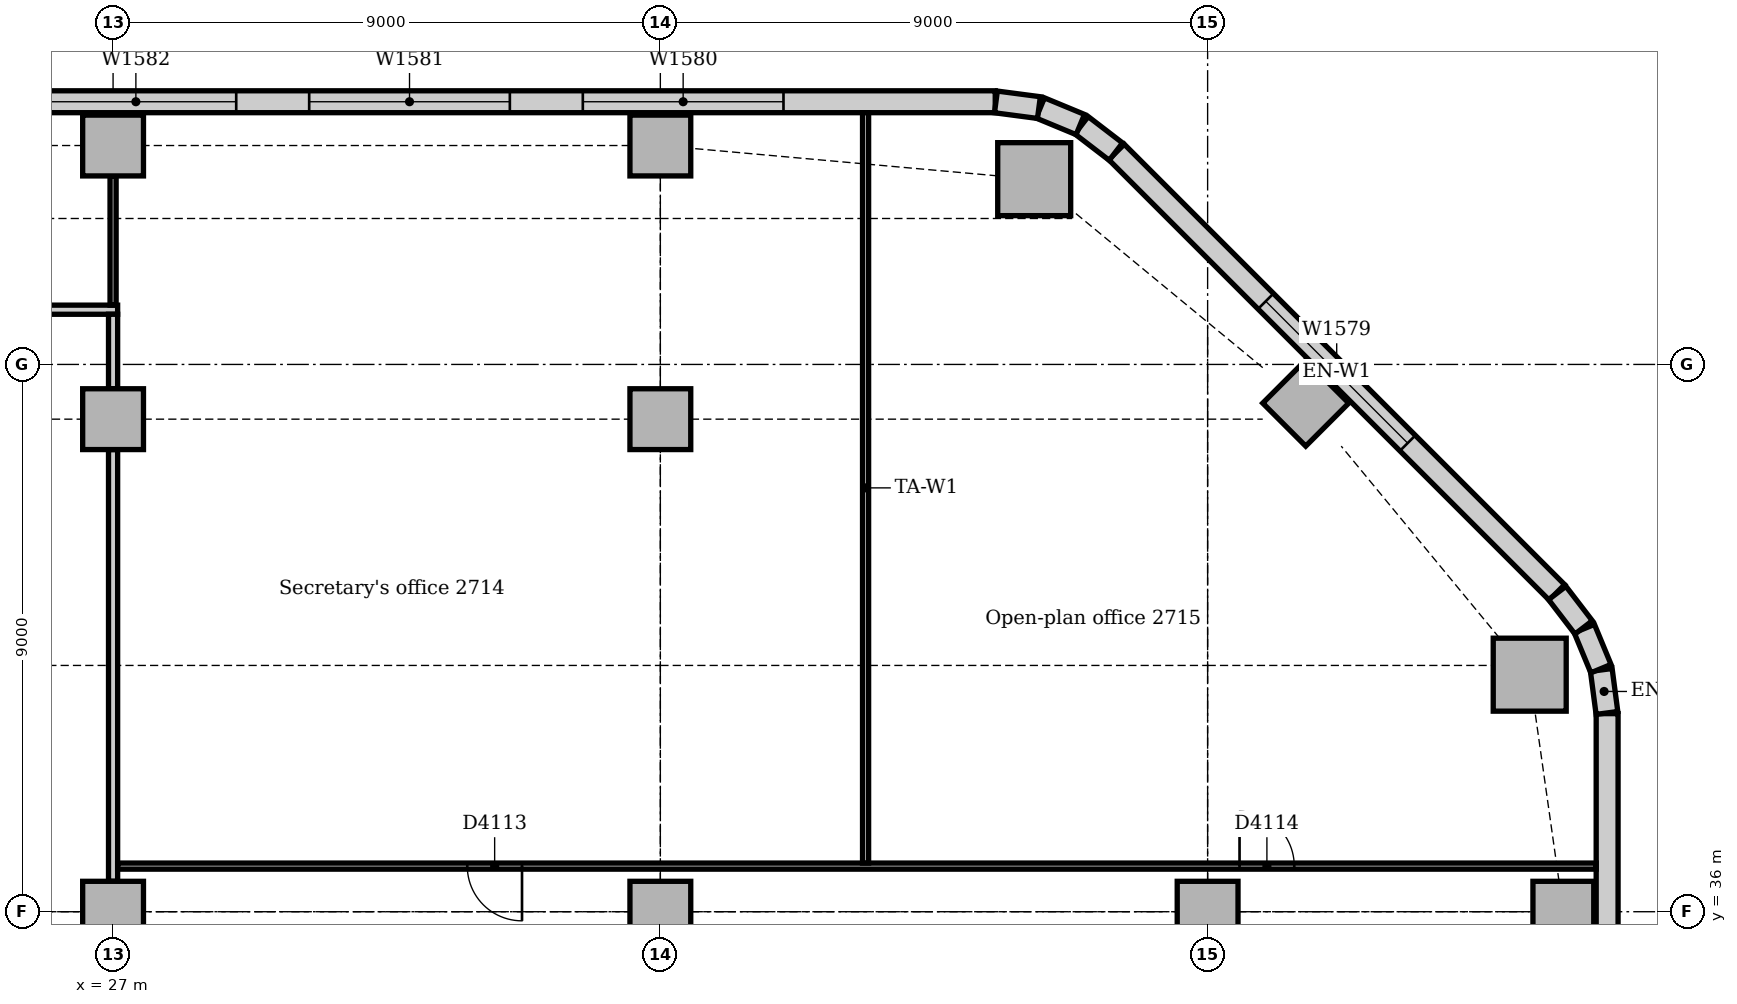
"""IFC4 building model, lengths in metres.
Left out: names, types, materials, properties, quantities, classifications, styles, units other than length and angle.
Written with IfcOpenShell. Run it as: python <this file> out.ifc"""

import sys

from ifc_helpers import new_model, si_unit, direction, frame, frame_2d, origin, origin_2d, place, context, subcontext, project, spatial, rectangle, extrude, element, fill, save


model = new_model("IFC4")
c1 = context("Model", 3, precision=1e-05, world=origin(), true_north=direction((0.0, 1.0)))
c2 = subcontext(c1, "Body", "Model", "MODEL_VIEW")
j1 = project(units=[si_unit("LENGTHUNIT", "METRE"), si_unit("PLANEANGLEUNIT", "RADIAN")], contexts=[c1])
p1 = place(None, origin())
s1 = spatial("IfcSite", under=j1, at=p1, CompositionType="ELEMENT")
p2 = place(p1, origin())
s2 = spatial("IfcBuilding", under=s1, at=p2, CompositionType="ELEMENT")
p3 = place(p2, frame((0.0, 0.0, 116.0)))
s3 = spatial("IfcBuildingStorey", under=s2, at=p3, CompositionType="ELEMENT", Elevation=116.0)
for number, where, z_axis, x_axis in (
    (1, (50.297, 39.898, 0.0), (0.0, 0.0, 1.0), (1.0, 0.0, 0.0)),
    (2, (42.148, 48.047, 0.0), (0.0, 0.0, 1.0), (1.0, 0.0, 0.0)),
):
    element("IfcColumn", number, at=place(p3, frame(where, z_axis=z_axis, x_axis=x_axis)), inside=s3, PredefinedType="COLUMN", context=c2, shape_type="SweptSolid", body=[
        extrude(rectangle(XDim=1.2, YDim=1.2, at=origin_2d()), origin(), (0.0, 0.0, 1.0), 3.85),
    ])
for number, where, z_axis, x_axis in (
    (3, (50.85, 36.0, 0.0), (0.0, 0.0, 1.0), (1.0, 0.0, 0.0)),
    (4, (46.614, 44.364, 0.0), (0.0, 0.0, 1.0), (0.707, 0.707, 0.0)),
    (5, (27.0, 48.6, 0.0), (0.0, 0.0, 1.0), (1.0, 0.0, 0.0)),
    (6, (36.0, 48.6, 0.0), (0.0, 0.0, 1.0), (1.0, 0.0, 0.0)),
    (7, (27.0, 36.0, 0.0), (0.0, 0.0, 1.0), (1.0, 0.0, 0.0)),
    (8, (27.0, 44.1, 0.0), (0.0, 0.0, 1.0), (1.0, 0.0, 0.0)),
    (9, (36.0, 36.0, 0.0), (0.0, 0.0, 1.0), (1.0, 0.0, 0.0)),
    (10, (36.0, 44.1, 0.0), (0.0, 0.0, 1.0), (1.0, 0.0, 0.0)),
    (11, (45.0, 36.0, 0.0), (0.0, 0.0, 1.0), (1.0, 0.0, 0.0)),
):
    element("IfcColumn", number, at=place(p3, frame(where, z_axis=z_axis, x_axis=x_axis)), inside=s3, PredefinedType="COLUMN", context=c2, shape_type="SweptSolid", body=[
        extrude(rectangle(XDim=1.0, YDim=1.0, at=origin_2d()), origin(), (0.0, 0.0, 1.0), 3.85),
    ])
p4 = place(p3, frame((51.57, 14.743, 0.0), z_axis=(0.0, 0.0, 1.0), x_axis=(0.0, 1.0, 0.0)))
e12 = element("IfcWall", 12, at=p4, inside=s3, PredefinedType="STANDARD", context=c2, shape_type="SweptSolid", body=[
    extrude(rectangle(XDim=24.515, YDim=0.36, at=frame_2d((12.257, 0.0))), origin(), (0.0, 0.0, 1.0), 3.85),
])
p5 = place(p4, frame((4.257, 0.0, 0.9)))
e13 = element("IfcOpeningElement", 13, at=p5, cuts=e12, PredefinedType="OPENING", context=c2, shape_type="SweptSolid", body=[
    extrude(rectangle(XDim=1.8, YDim=1.6, at=frame_2d((0.9, 0.8))), frame((0.0, 0.19, 0.0), z_axis=(0.0, -1.0, 0.0), x_axis=(1.0, 0.0, 0.0)), (0.0, 0.0, 1.0), 0.38),
])
p6 = place(p4, frame((8.357, 0.0, 0.9)))
e14 = element("IfcOpeningElement", 14, at=p6, cuts=e12, PredefinedType="OPENING", context=c2, shape_type="SweptSolid", body=[
    extrude(rectangle(XDim=3.3, YDim=1.6, at=frame_2d((1.65, 0.8))), frame((0.0, 0.19, 0.0), z_axis=(0.0, -1.0, 0.0), x_axis=(1.0, 0.0, 0.0)), (0.0, 0.0, 1.0), 0.38),
])
p7 = place(p4, frame((12.857, 0.0, 0.9)))
e15 = element("IfcOpeningElement", 15, at=p7, cuts=e12, PredefinedType="OPENING", context=c2, shape_type="SweptSolid", body=[
    extrude(rectangle(XDim=3.3, YDim=1.6, at=frame_2d((1.65, 0.8))), frame((0.0, 0.19, 0.0), z_axis=(0.0, -1.0, 0.0), x_axis=(1.0, 0.0, 0.0)), (0.0, 0.0, 1.0), 0.38),
])
p8 = place(p4, frame((17.357, 0.0, 0.9)))
e16 = element("IfcOpeningElement", 16, at=p8, cuts=e12, PredefinedType="OPENING", context=c2, shape_type="SweptSolid", body=[
    extrude(rectangle(XDim=3.3, YDim=1.6, at=frame_2d((1.65, 0.8))), frame((0.0, 0.19, 0.0), z_axis=(0.0, -1.0, 0.0), x_axis=(1.0, 0.0, 0.0)), (0.0, 0.0, 1.0), 0.38),
])
p9 = place(p3, frame((50.744, 41.251, 0.0), z_axis=(0.0, 0.0, 1.0), x_axis=(-0.707106781187, 0.707106781187, 0.0)))
e17 = element("IfcWall", 17, at=p9, inside=s3, PredefinedType="STANDARD", context=c2, shape_type="SweptSolid", body=[
    extrude(rectangle(XDim=10.243, YDim=0.36, at=frame_2d((5.121, 0.0))), origin(), (0.0, 0.0, 1.0), 3.85),
])
p10 = place(p9, frame((3.471, 0.0, 0.9)))
e18 = element("IfcOpeningElement", 18, at=p10, cuts=e17, PredefinedType="OPENING", context=c2, shape_type="SweptSolid", body=[
    extrude(rectangle(XDim=3.3, YDim=1.6, at=frame_2d((1.65, 0.8))), frame((0.0, 0.19, 0.0), z_axis=(0.0, -1.0, 0.0), x_axis=(1.0, 0.0, 0.0)), (0.0, 0.0, 1.0), 0.38),
])
p11 = place(p3, frame((41.507, 49.32, 0.0), z_axis=(0.0, 0.0, 1.0), x_axis=(-1.0, 0.0, 0.0)))
e19 = element("IfcWall", 19, at=p11, inside=s3, PredefinedType="STANDARD", context=c2, shape_type="SweptSolid", body=[
    extrude(rectangle(XDim=37.265, YDim=0.36, at=frame_2d((18.632, 0.0))), origin(), (0.0, 0.0, 1.0), 3.85),
])
p12 = place(p11, frame((3.482, 0.0, 0.9)))
e20 = element("IfcOpeningElement", 20, at=p12, cuts=e19, PredefinedType="OPENING", context=c2, shape_type="SweptSolid", body=[
    extrude(rectangle(XDim=3.3, YDim=1.6, at=frame_2d((1.65, 0.8))), frame((0.0, 0.19, 0.0), z_axis=(0.0, -1.0, 0.0), x_axis=(1.0, 0.0, 0.0)), (0.0, 0.0, 1.0), 0.38),
])
p13 = place(p11, frame((7.982, 0.0, 0.9)))
e21 = element("IfcOpeningElement", 21, at=p13, cuts=e19, PredefinedType="OPENING", context=c2, shape_type="SweptSolid", body=[
    extrude(rectangle(XDim=3.3, YDim=1.6, at=frame_2d((1.65, 0.8))), frame((0.0, 0.19, 0.0), z_axis=(0.0, -1.0, 0.0), x_axis=(1.0, 0.0, 0.0)), (0.0, 0.0, 1.0), 0.38),
])
p14 = place(p11, frame((12.482, 0.0, 0.9)))
e22 = element("IfcOpeningElement", 22, at=p14, cuts=e19, PredefinedType="OPENING", context=c2, shape_type="SweptSolid", body=[
    extrude(rectangle(XDim=3.3, YDim=1.6, at=frame_2d((1.65, 0.8))), frame((0.0, 0.19, 0.0), z_axis=(0.0, -1.0, 0.0), x_axis=(1.0, 0.0, 0.0)), (0.0, 0.0, 1.0), 0.38),
])
p15 = place(p11, frame((16.982, 0.0, 0.9)))
e23 = element("IfcOpeningElement", 23, at=p15, cuts=e19, PredefinedType="OPENING", context=c2, shape_type="SweptSolid", body=[
    extrude(rectangle(XDim=3.3, YDim=1.6, at=frame_2d((1.65, 0.8))), frame((0.0, 0.19, 0.0), z_axis=(0.0, -1.0, 0.0), x_axis=(1.0, 0.0, 0.0)), (0.0, 0.0, 1.0), 0.38),
])
p16 = place(p11, frame((21.482, 0.0, 0.9)))
e24 = element("IfcOpeningElement", 24, at=p16, cuts=e19, PredefinedType="OPENING", context=c2, shape_type="SweptSolid", body=[
    extrude(rectangle(XDim=3.3, YDim=1.6, at=frame_2d((1.65, 0.8))), frame((0.0, 0.19, 0.0), z_axis=(0.0, -1.0, 0.0), x_axis=(1.0, 0.0, 0.0)), (0.0, 0.0, 1.0), 0.38),
])
p17 = place(p11, frame((26.032, 0.0, 0.9)))
e25 = element("IfcOpeningElement", 25, at=p17, cuts=e19, PredefinedType="OPENING", context=c2, shape_type="SweptSolid", body=[
    extrude(rectangle(XDim=1.8, YDim=1.6, at=frame_2d((0.9, 0.8))), frame((0.0, 0.19, 0.0), z_axis=(0.0, -1.0, 0.0), x_axis=(1.0, 0.0, 0.0)), (0.0, 0.0, 1.0), 0.38),
])
p18 = place(p11, frame((30.482, 0.0, 0.9)))
e26 = element("IfcOpeningElement", 26, at=p18, cuts=e19, PredefinedType="OPENING", context=c2, shape_type="SweptSolid", body=[
    extrude(rectangle(XDim=3.3, YDim=1.6, at=frame_2d((1.65, 0.8))), frame((0.0, 0.19, 0.0), z_axis=(0.0, -1.0, 0.0), x_axis=(1.0, 0.0, 0.0)), (0.0, 0.0, 1.0), 0.38),
])
for number, where, z_axis, x_axis in (
    (27, (51.567, 39.269, 0.0), (0.0, 0.0, 1.0), (-0.131, 0.991, 0.0)),
    (28, (51.468, 39.997, 0.0), (0.0, 0.0, 1.0), (-0.383, 0.924, 0.0)),
):
    element("IfcWall", number, at=place(p3, frame(where, z_axis=z_axis, x_axis=x_axis)), inside=s3, PredefinedType="STANDARD", context=c2, shape_type="SweptSolid", body=[
        extrude(rectangle(XDim=0.713, YDim=0.36, at=frame_2d((0.356, 0.0))), origin(), (0.0, 0.0, 1.0), 3.85),
    ])
for number, where, z_axis, x_axis in (
    (29, (51.184, 40.675, 0.0), (0.0, 0.0, 1.0), (-0.609, 0.793, 0.0)),
    (30, (43.491, 48.5, 0.0), (0.0, 0.0, 1.0), (-0.793, 0.609, 0.0)),
):
    element("IfcWall", number, at=place(p3, frame(where, z_axis=z_axis, x_axis=x_axis)), inside=s3, PredefinedType="STANDARD", context=c2, shape_type="SweptSolid", body=[
        extrude(rectangle(XDim=0.713, YDim=0.36, at=frame_2d((0.357, 0.0))), origin(), (0.0, 0.0, 1.0), 3.85),
    ])
for number, where, z_axis, x_axis in (
    (31, (42.906, 48.945, 0.0), (0.0, 0.0, 1.0), (-0.924, 0.383, 0.0)),
    (32, (42.226, 49.224, 0.0), (0.0, 0.0, 1.0), (-0.991, 0.131, 0.0)),
):
    element("IfcWall", number, at=place(p3, frame(where, z_axis=z_axis, x_axis=x_axis)), inside=s3, PredefinedType="STANDARD", context=c2, shape_type="SweptSolid", body=[
        extrude(rectangle(XDim=0.713, YDim=0.36, at=frame_2d((0.356, 0.0))), origin(), (0.0, 0.0, 1.0), 3.85),
    ])
p19 = place(p3, frame((2.053, 45.9, 0.0), z_axis=(0.0, 0.0, 1.0), x_axis=(1.0, 0.0, 0.0)))
e33 = element("IfcWall", 33, at=p19, inside=s3, PredefinedType="PARTITIONING", context=c2, shape_type="SweptSolid", body=[
    extrude(rectangle(XDim=25.022, YDim=0.15, at=frame_2d((12.511, 0.0))), origin(), (0.0, 0.0, 1.0), 3.85),
])
p20 = place(p19, frame((5.35, 0.0, 0.0)))
e34 = element("IfcOpeningElement", 34, at=p20, cuts=e33, PredefinedType="OPENING", context=c2, shape_type="SweptSolid", body=[
    extrude(rectangle(XDim=0.9, YDim=2.1, at=frame_2d((0.45, 1.05))), frame((0.0, 0.085, 0.0), z_axis=(0.0, -1.0, 0.0), x_axis=(1.0, 0.0, 0.0)), (0.0, 0.0, 1.0), 0.17),
])
p21 = place(p19, frame((15.497, 0.0, 0.0)))
e35 = element("IfcOpeningElement", 35, at=p21, cuts=e33, PredefinedType="OPENING", context=c2, shape_type="SweptSolid", body=[
    extrude(rectangle(XDim=0.9, YDim=2.1, at=frame_2d((0.45, 1.05))), frame((0.0, 0.085, 0.0), z_axis=(0.0, -1.0, 0.0), x_axis=(1.0, 0.0, 0.0)), (0.0, 0.0, 1.0), 0.17),
])
p22 = place(p3, frame((27.0, 36.5, 0.0), z_axis=(0.0, 0.0, 1.0), x_axis=(0.0, 1.0, 0.0)))
e36 = element("IfcWall", 36, at=p22, inside=s3, PredefinedType="PARTITIONING", context=c2, shape_type="SweptSolid", body=[
    extrude(rectangle(XDim=7.1, YDim=0.15, at=frame_2d((3.55, 0.0))), origin(), (0.0, 0.0, 1.0), 3.256),
])
p23 = place(p3, frame((27.0, 44.6, 0.0), z_axis=(0.0, 0.0, 1.0), x_axis=(0.0, 1.0, 0.0)))
e37 = element("IfcWall", 37, at=p23, inside=s3, PredefinedType="PARTITIONING", context=c2, shape_type="SweptSolid", body=[
    extrude(rectangle(XDim=1.225, YDim=0.15, at=frame_2d((0.613, 0.0))), origin(), (0.0, 0.0, 1.0), 3.652),
])
p24 = place(p3, frame((27.075, 36.75, 0.0), z_axis=(0.0, 0.0, 1.0), x_axis=(1.0, 0.0, 0.0)))
e38 = element("IfcWall", 38, at=p24, inside=s3, PredefinedType="PARTITIONING", context=c2, shape_type="SweptSolid", body=[
    extrude(rectangle(XDim=24.315, YDim=0.1, at=frame_2d((12.158, 0.0))), origin(), (0.0, 0.0, 1.0), 3.85),
])
p25 = place(p24, frame((5.75, 0.0, 0.0)))
e39 = element("IfcOpeningElement", 39, at=p25, cuts=e38, PredefinedType="OPENING", context=c2, shape_type="SweptSolid", body=[
    extrude(rectangle(XDim=0.9, YDim=2.1, at=frame_2d((0.45, 1.05))), frame((0.0, 0.06, 0.0), z_axis=(0.0, -1.0, 0.0), x_axis=(1.0, 0.0, 0.0)), (0.0, 0.0, 1.0), 0.12),
])
p26 = place(p24, frame((18.45, 0.0, 0.0)))
e40 = element("IfcOpeningElement", 40, at=p26, cuts=e38, PredefinedType="OPENING", context=c2, shape_type="SweptSolid", body=[
    extrude(rectangle(XDim=0.9, YDim=2.1, at=frame_2d((0.45, 1.05))), frame((0.0, 0.06, 0.0), z_axis=(0.0, -1.0, 0.0), x_axis=(1.0, 0.0, 0.0)), (0.0, 0.0, 1.0), 0.12),
])
p27 = place(p3, frame((39.375, 36.8, 0.0), z_axis=(0.0, 0.0, 1.0), x_axis=(0.0, 1.0, 0.0)))
e41 = element("IfcWall", 41, at=p27, inside=s3, PredefinedType="PARTITIONING", context=c2, shape_type="SweptSolid", body=[
    extrude(rectangle(XDim=12.34, YDim=0.1, at=frame_2d((6.17, 0.0))), origin(), (0.0, 0.0, 1.0), 3.85),
])
p28 = place(p3, frame((27.0, 45.975, 0.0), z_axis=(0.0, 0.0, 1.0), x_axis=(0.0, 1.0, 0.0)))
e42 = element("IfcWall", 42, at=p28, inside=s3, PredefinedType="PARTITIONING", context=c2, shape_type="SweptSolid", body=[
    extrude(rectangle(XDim=2.125, YDim=0.1, at=frame_2d((1.062, 0.0))), origin(), (0.0, 0.0, 1.0), 3.652),
])
p29 = place(p10, origin())
e43 = element("IfcWindow", 43, at=p29, inside=s3, PartitioningType="SINGLE_PANEL", PredefinedType="WINDOW", context=c2, shape_type="SweptSolid", body=[
    extrude(rectangle(XDim=3.3, YDim=1.6, at=frame_2d((1.65, 0.8))), frame((0.0, 0.13, 0.0), z_axis=(0.0, -1.0, 0.0), x_axis=(1.0, 0.0, 0.0)), (0.0, 0.0, 1.0), 0.06),
])
fill(e18, e43)
p30 = place(p12, origin())
e44 = element("IfcWindow", 44, at=p30, inside=s3, PartitioningType="SINGLE_PANEL", PredefinedType="WINDOW", context=c2, shape_type="SweptSolid", body=[
    extrude(rectangle(XDim=3.3, YDim=1.6, at=frame_2d((1.65, 0.8))), frame((0.0, 0.13, 0.0), z_axis=(0.0, -1.0, 0.0), x_axis=(1.0, 0.0, 0.0)), (0.0, 0.0, 1.0), 0.06),
])
fill(e20, e44)
p31 = place(p13, origin())
e45 = element("IfcWindow", 45, at=p31, inside=s3, PartitioningType="SINGLE_PANEL", PredefinedType="WINDOW", context=c2, shape_type="SweptSolid", body=[
    extrude(rectangle(XDim=3.3, YDim=1.6, at=frame_2d((1.65, 0.8))), frame((0.0, 0.13, 0.0), z_axis=(0.0, -1.0, 0.0), x_axis=(1.0, 0.0, 0.0)), (0.0, 0.0, 1.0), 0.06),
])
fill(e21, e45)
p32 = place(p14, origin())
e46 = element("IfcWindow", 46, at=p32, inside=s3, PartitioningType="SINGLE_PANEL", PredefinedType="WINDOW", context=c2, shape_type="SweptSolid", body=[
    extrude(rectangle(XDim=3.3, YDim=1.6, at=frame_2d((1.65, 0.8))), frame((0.0, 0.13, 0.0), z_axis=(0.0, -1.0, 0.0), x_axis=(1.0, 0.0, 0.0)), (0.0, 0.0, 1.0), 0.06),
])
fill(e22, e46)
p33 = place(p25, frame((0.9, 0.0, 0.0), z_axis=(0.0, 0.0, 1.0), x_axis=(-1.0, 0.0, 0.0)))
e47 = element("IfcDoor", 47, at=p33, inside=s3, OperationType="SINGLE_SWING_LEFT", PredefinedType="DOOR", context=c2, shape_type="SweptSolid", body=[
    extrude(rectangle(XDim=0.9, YDim=2.1, at=frame_2d((0.45, 1.05))), frame((0.0, 0.025, 0.0), z_axis=(0.0, -1.0, 0.0), x_axis=(1.0, 0.0, 0.0)), (0.0, 0.0, 1.0), 0.05),
])
fill(e39, e47)
p34 = place(p26, origin())
e48 = element("IfcDoor", 48, at=p34, inside=s3, OperationType="SINGLE_SWING_LEFT", PredefinedType="DOOR", context=c2, shape_type="SweptSolid", body=[
    extrude(rectangle(XDim=0.9, YDim=2.1, at=frame_2d((0.45, 1.05))), frame((0.0, 0.025, 0.0), z_axis=(0.0, -1.0, 0.0), x_axis=(1.0, 0.0, 0.0)), (0.0, 0.0, 1.0), 0.05),
])
fill(e40, e48)
save(model, sys.argv[1])
